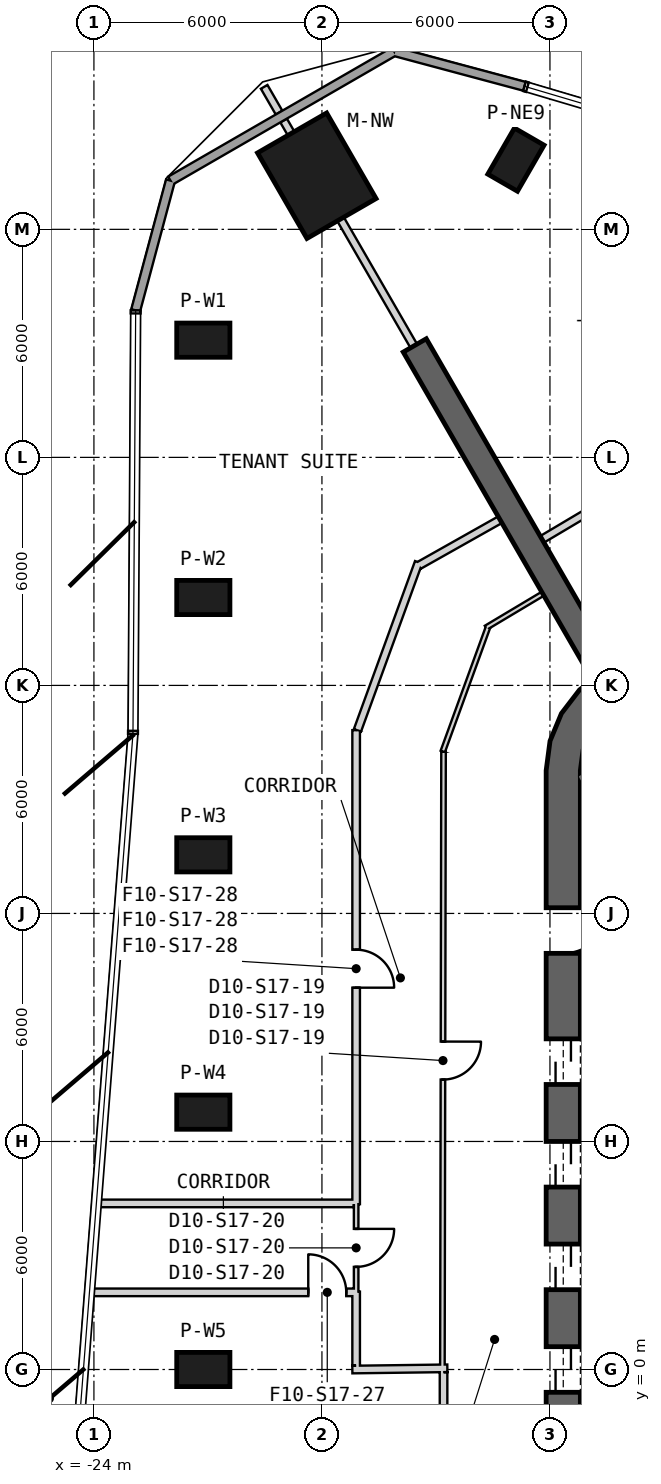
"""IFC4 building model, lengths in metres.
Left out: names, types, materials, properties, quantities, classifications, styles, units other than length and angle.
Written with IfcOpenShell. Run it as: python <this file> out.ifc"""

import sys

from ifc_helpers import new_model, si_unit, direction, frame, frame_2d, origin, origin_2d, place, context, subcontext, project, spatial, polyline, rectangle, outline, extrude, element, fill, save


model = new_model("IFC4")
c1 = context("Model", 3, precision=1e-05, world=origin(), true_north=direction((0.0, 1.0)))
c2 = subcontext(c1, "Body", "Model", "MODEL_VIEW")
j1 = project(units=[si_unit("LENGTHUNIT", "METRE"), si_unit("PLANEANGLEUNIT", "RADIAN")], contexts=[c1])
p1 = place(None, origin())
s1 = spatial("IfcSite", under=j1, at=p1, CompositionType="ELEMENT")
p2 = place(p1, origin())
s2 = spatial("IfcBuilding", under=s1, at=p2, CompositionType="ELEMENT")
p3 = place(p2, frame((0.0, 0.0, 265.2)))
s3 = spatial("IfcBuildingStorey", under=s2, at=p3, CompositionType="ELEMENT", Elevation=265.2)
p4 = place(p3, frame((-18.135, 31.411, 0.0), z_axis=(0.0, 0.0, 1.0), x_axis=(-0.5, 0.866025403784, 0.0)))
e1 = element("IfcColumn", 1, at=p4, inside=s3, PredefinedType="COLUMN", context=c2, shape_type="SweptSolid", body=[
    extrude(rectangle(XDim=2.6, YDim=2.1, at=origin_2d()), origin(), (0.0, 0.0, 1.0), 4.0),
])
for number, where, z_axis, x_axis in (
    (2, (-21.121, 27.084, 0.0), (0.0, 0.0, 1.0), (-1.0, 0.0, 0.0)),
    (3, (-21.121, 20.313, 0.0), (0.0, 0.0, 1.0), (-1.0, 0.0, 0.0)),
    (4, (-21.121, 13.542, 0.0), (0.0, 0.0, 1.0), (-1.0, 0.0, 0.0)),
    (5, (-21.121, 6.771, 0.0), (0.0, 0.0, 1.0), (-1.0, 0.0, 0.0)),
    (6, (-21.121, 0.0, 0.0), (0.0, 0.0, 1.0), (-1.0, 0.0, 0.0)),
    (7, (-12.895, 31.833, 0.0), (0.0, 0.0, 1.0), (0.5, 0.866, 0.0)),
):
    element("IfcColumn", number, at=place(p3, frame(where, z_axis=z_axis, x_axis=x_axis)), inside=s3, PredefinedType="COLUMN", context=c2, shape_type="SweptSolid", body=[
        extrude(rectangle(XDim=1.4, YDim=0.9, at=origin_2d()), origin(), (0.0, 0.0, 1.0), 4.0),
    ])
p5 = place(p3, frame((-11.65, 15.762, 0.0), z_axis=(0.0, 0.0, 1.0), x_axis=(0.0, -1.0, 0.0)))
e8 = element("IfcWall", 8, at=p5, inside=s3, PredefinedType="SHEAR", context=c2, shape_type="SweptSolid", body=[
    extrude(rectangle(XDim=31.523, YDim=0.9, at=frame_2d((15.762, 0.0))), origin(), (0.0, 0.0, 1.0), 4.0),
])
p6 = place(p5, frame((7.062, 0.0, 0.0)))
e9 = element("IfcOpeningElement", 9, at=p6, cuts=e8, PredefinedType="OPENING", context=c2, shape_type="SweptSolid", body=[
    extrude(rectangle(XDim=1.2, YDim=2.4, at=frame_2d((0.6, 1.2))), frame((0.0, 0.46, 0.0), z_axis=(0.0, -1.0, 0.0), x_axis=(1.0, 0.0, 0.0)), (0.0, 0.0, 1.0), 0.92),
])
p7 = place(p5, frame((9.762, 0.0, 0.0)))
e10 = element("IfcOpeningElement", 10, at=p7, cuts=e8, PredefinedType="OPENING", context=c2, shape_type="SweptSolid", body=[
    extrude(rectangle(XDim=1.2, YDim=2.4, at=frame_2d((0.6, 1.2))), frame((0.0, 0.46, 0.0), z_axis=(0.0, -1.0, 0.0), x_axis=(1.0, 0.0, 0.0)), (0.0, 0.0, 1.0), 0.92),
])
p8 = place(p5, frame((12.462, 0.0, 0.0)))
e11 = element("IfcOpeningElement", 11, at=p8, cuts=e8, PredefinedType="OPENING", context=c2, shape_type="SweptSolid", body=[
    extrude(rectangle(XDim=1.2, YDim=2.4, at=frame_2d((0.6, 1.2))), frame((0.0, 0.46, 0.0), z_axis=(0.0, -1.0, 0.0), x_axis=(1.0, 0.0, 0.0)), (0.0, 0.0, 1.0), 0.92),
])
p9 = place(p5, frame((15.162, 0.0, 0.0)))
e12 = element("IfcOpeningElement", 12, at=p9, cuts=e8, PredefinedType="OPENING", context=c2, shape_type="SweptSolid", body=[
    extrude(rectangle(XDim=1.2, YDim=2.4, at=frame_2d((0.6, 1.2))), frame((0.0, 0.46, 0.0), z_axis=(0.0, -1.0, 0.0), x_axis=(1.0, 0.0, 0.0)), (0.0, 0.0, 1.0), 0.92),
])
p10 = place(p5, frame((17.862, 0.0, 0.0)))
e13 = element("IfcOpeningElement", 13, at=p10, cuts=e8, PredefinedType="OPENING", context=c2, shape_type="SweptSolid", body=[
    extrude(rectangle(XDim=1.2, YDim=2.4, at=frame_2d((0.6, 1.2))), frame((0.0, 0.46, 0.0), z_axis=(0.0, -1.0, 0.0), x_axis=(1.0, 0.0, 0.0)), (0.0, 0.0, 1.0), 0.92),
])
p11 = place(p5, frame((20.562, 0.0, 0.0)))
e14 = element("IfcOpeningElement", 14, at=p11, cuts=e8, PredefinedType="OPENING", context=c2, shape_type="SweptSolid", body=[
    extrude(rectangle(XDim=1.2, YDim=2.4, at=frame_2d((0.6, 1.2))), frame((0.0, 0.46, 0.0), z_axis=(0.0, -1.0, 0.0), x_axis=(1.0, 0.0, 0.0)), (0.0, 0.0, 1.0), 0.92),
])
p12 = place(p5, frame((23.262, 0.0, 0.0)))
e15 = element("IfcOpeningElement", 15, at=p12, cuts=e8, PredefinedType="OPENING", context=c2, shape_type="SweptSolid", body=[
    extrude(rectangle(XDim=1.2, YDim=2.4, at=frame_2d((0.6, 1.2))), frame((0.0, 0.46, 0.0), z_axis=(0.0, -1.0, 0.0), x_axis=(1.0, 0.0, 0.0)), (0.0, 0.0, 1.0), 0.92),
])
p13 = place(p5, frame((3.612, 0.0, 0.0)))
e16 = element("IfcOpeningElement", 16, at=p13, cuts=e8, PredefinedType="OPENING", context=c2, shape_type="SweptSolid", body=[
    extrude(rectangle(XDim=1.2, YDim=2.4, at=frame_2d((0.6, 1.2))), frame((0.0, 0.46, 0.0), z_axis=(0.0, -1.0, 0.0), x_axis=(1.0, 0.0, 0.0)), (0.0, 0.0, 1.0), 0.92),
])
p14 = place(p5, frame((26.712, 0.0, 0.0)))
e17 = element("IfcOpeningElement", 17, at=p14, cuts=e8, PredefinedType="OPENING", context=c2, shape_type="SweptSolid", body=[
    extrude(rectangle(XDim=1.2, YDim=2.4, at=frame_2d((0.6, 1.2))), frame((0.0, 0.46, 0.0), z_axis=(0.0, -1.0, 0.0), x_axis=(1.0, 0.0, 0.0)), (0.0, 0.0, 1.0), 0.92),
])
p15 = place(p3, origin())
e18 = element("IfcWall", 18, at=p15, inside=s3, PredefinedType="SHEAR", context=c2, shape_type="SweptSolid", body=[
    extrude(outline(polyline([(-7.6, 18.36), (-8.323, 18.659), (-9.1, 18.762), (-9.876, 18.659), (-10.6, 18.36), (-11.221, 17.883), (-11.698, 17.262), (-11.998, 16.538), (-12.1, 15.762), (-11.2, 15.762), (-11.128, 16.305), (-10.919, 16.812), (-10.585, 17.247), (-10.15, 17.58), (-9.644, 17.79), (-9.1, 17.862), (-8.556, 17.79), (-8.05, 17.58), (-7.6, 18.36)])), origin(), (0.0, 0.0, 1.0), 4.0),
])
p16 = place(p3, frame((-10.575, 18.316, 0.0), z_axis=(0.0, 0.0, 1.0), x_axis=(-0.500007350791, 0.866021159762, 0.0)))
e19 = element("IfcWall", 19, at=p16, inside=s3, PredefinedType="SHEAR", context=c2, shape_type="SweptSolid", body=[
    extrude(rectangle(XDim=9.965, YDim=0.7, at=frame_2d((4.982, 0.0))), origin(), (0.0, 0.0, 1.0), 4.0),
])
p17 = place(p3, frame((-12.67, 33.764, 0.0), z_axis=(0.0, 0.0, 1.0), x_axis=(-0.965927175343, 0.258814010312, 0.0)))
e20 = element("IfcWall", 20, at=p17, inside=s3, PredefinedType="SOLIDWALL", context=c2, shape_type="SweptSolid", body=[
    extrude(rectangle(XDim=3.55, YDim=0.24, at=frame_2d((1.775, 0.0))), origin(), (0.0, 0.0, 1.0), 3.7),
])
p18 = place(p3, frame((-16.099, 34.682, 0.0), z_axis=(0.0, 0.0, 1.0), x_axis=(-0.866022320763, -0.500005339912, 0.0)))
e21 = element("IfcWall", 21, at=p18, inside=s3, PredefinedType="SOLIDWALL", context=c2, shape_type="SweptSolid", body=[
    extrude(rectangle(XDim=6.798, YDim=0.24, at=frame_2d((3.399, 0.0))), origin(), (0.0, 0.0, 1.0), 3.7),
])
p19 = place(p3, frame((-21.986, 31.283, 0.0), z_axis=(0.0, 0.0, 1.0), x_axis=(-0.258844219627, -0.965919080444, 0.0)))
e22 = element("IfcWall", 22, at=p19, inside=s3, PredefinedType="SOLIDWALL", context=c2, shape_type="SweptSolid", body=[
    extrude(rectangle(XDim=3.536, YDim=0.24, at=frame_2d((1.768, 0.0))), origin(), (0.0, 0.0, 1.0), 3.7),
])
p20 = place(p3, frame((-11.2, 9.42, 0.0), z_axis=(0.0, 0.0, 1.0), x_axis=(0.999957167047, 0.009255488683, 0.0)))
e23 = element("IfcWall", 23, at=p20, inside=s3, PredefinedType="PLUMBINGWALL", context=c2, shape_type="SweptSolid", body=[
    extrude(rectangle(XDim=3.35, YDim=0.2, at=frame_2d((1.675, 0.0))), origin(), (0.0, 0.0, 1.0), 3.7),
])
p21 = place(p3, frame((-11.245, 15.678, -0.3), z_axis=(0.0, 0.0, 1.0), x_axis=(0.499977274689, -0.866038523851, 0.0)))
e24 = element("IfcWall", 24, at=p21, inside=s3, PredefinedType="SHEAR", context=c2, shape_type="SweptSolid", body=[
    extrude(rectangle(XDim=8.1, YDim=0.2, at=frame_2d((4.05, 0.0))), origin(), (0.0, 0.0, 1.0), 4.0),
])
p22 = place(p3, frame((-12.189, 20.411, 0.0), z_axis=(0.0, 0.0, 1.0), x_axis=(-0.858492721014, -0.51282574815, 0.0)))
e25 = element("IfcWall", 25, at=p22, inside=s3, PredefinedType="PARTITIONING", context=c2, shape_type="SweptSolid", body=[
    extrude(rectangle(XDim=1.742, YDim=0.12, at=frame_2d((0.871, 0.0))), origin(), (0.0, 0.0, 1.0), 3.7),
])
p23 = place(p3, frame((-13.631, 19.53, 0.0), z_axis=(0.0, 0.0, 1.0), x_axis=(-0.342069878069, -0.939674517329, 0.0)))
e26 = element("IfcWall", 26, at=p23, inside=s3, PredefinedType="PARTITIONING", context=c2, shape_type="SweptSolid", body=[
    extrude(rectangle(XDim=3.479, YDim=0.12, at=frame_2d((1.739, 0.0))), origin(), (0.0, 0.0, 1.0), 2.88),
])
p24 = place(p3, frame((-14.8, 16.257, 0.0), z_axis=(0.0, 0.0, 1.0), x_axis=(-0.001847148781, -0.999998294019, 0.0)))
e27 = element("IfcWall", 27, at=p24, inside=s3, PredefinedType="PARTITIONING", context=c2, shape_type="SweptSolid", body=[
    extrude(rectangle(XDim=16.257, YDim=0.12, at=frame_2d((8.128, 0.0))), origin(), (0.0, 0.0, 1.0), 2.98),
])
p25 = place(p24, frame((7.629, 0.0, 0.0)))
e28 = element("IfcOpeningElement", 28, at=p25, cuts=e27, PredefinedType="OPENING", context=c2, shape_type="SweptSolid", body=[
    extrude(rectangle(XDim=1.0, YDim=2.1, at=frame_2d((0.5, 1.05))), frame((0.0, 0.07, 0.0), z_axis=(0.0, -1.0, 0.0), x_axis=(1.0, 0.0, 0.0)), (0.0, 0.0, 1.0), 0.14),
])
p26 = place(p3, frame((-17.1, 4.35, 0.0), z_axis=(0.0, 0.0, 1.0), x_axis=(0.0, -1.0, 0.0)))
e29 = element("IfcWall", 29, at=p26, inside=s3, PredefinedType="PARTITIONING", context=c2, shape_type="SweptSolid", body=[
    extrude(rectangle(XDim=2.3, YDim=0.12, at=frame_2d((1.15, 0.0))), origin(), (0.0, 0.0, 1.0), 3.7),
])
p27 = place(p26, frame((0.65, 0.0, 0.0)))
e30 = element("IfcOpeningElement", 30, at=p27, cuts=e29, PredefinedType="OPENING", context=c2, shape_type="SweptSolid", body=[
    extrude(rectangle(XDim=1.0, YDim=2.1, at=frame_2d((0.5, 1.05))), frame((0.0, 0.07, 0.0), z_axis=(0.0, -1.0, 0.0), x_axis=(1.0, 0.0, 0.0)), (0.0, 0.0, 1.0), 0.14),
])
p28 = place(p3, frame((-17.2, -0.001, 0.0), z_axis=(0.0, 0.0, 1.0), x_axis=(0.999915662945, 0.012987185857, 0.0)))
e31 = element("IfcWall", 31, at=p28, inside=s3, PredefinedType="PARTITIONING", context=c2, shape_type="SweptSolid", body=[
    extrude(rectangle(XDim=2.5, YDim=0.2, at=frame_2d((1.25, 0.0))), origin(), (0.0, 0.0, 1.0), 3.07),
])
p29 = place(p3, frame((-17.1, 16.823, 0.0), z_axis=(0.0, 0.0, 1.0), x_axis=(0.0, -1.0, 0.0)))
e32 = element("IfcWall", 32, at=p29, inside=s3, PredefinedType="PARTITIONING", context=c2, shape_type="SweptSolid", body=[
    extrude(rectangle(XDim=12.473, YDim=0.2, at=frame_2d((6.236, 0.0))), origin(), (0.0, 0.0, 1.0), 2.98),
])
p30 = place(p29, frame((5.776, 0.0, 0.0)))
e33 = element("IfcOpeningElement", 33, at=p30, cuts=e32, PredefinedType="OPENING", context=c2, shape_type="SweptSolid", body=[
    extrude(rectangle(XDim=1.0, YDim=2.1, at=frame_2d((0.5, 1.05))), frame((0.0, 0.11, 0.0), z_axis=(0.0, -1.0, 0.0), x_axis=(1.0, 0.0, 0.0)), (0.0, 0.0, 1.0), 0.22),
])
p31 = place(p3, frame((-17.1, 2.05, 0.0), z_axis=(0.0, 0.0, 1.0), x_axis=(0.0, -1.0, 0.0)))
e34 = element("IfcWall", 34, at=p31, inside=s3, PredefinedType="PARTITIONING", context=c2, shape_type="SweptSolid", body=[
    extrude(rectangle(XDim=1.95, YDim=0.2, at=frame_2d((0.975, 0.0))), origin(), (0.0, 0.0, 1.0), 3.07),
])
p32 = place(p3, frame((-15.456, 21.239, 0.0), z_axis=(0.0, 0.0, 1.0), x_axis=(-0.34205546997, -0.939679762187, 0.0)))
e35 = element("IfcWall", 35, at=p32, inside=s3, PredefinedType="PARTITIONING", context=c2, shape_type="SweptSolid", body=[
    extrude(rectangle(XDim=4.706, YDim=0.2, at=frame_2d((2.353, 0.0))), origin(), (0.0, 0.0, 1.0), 2.88),
])
p33 = place(p3, frame((-13.313, 22.359, 0.0), z_axis=(0.0, 0.0, 1.0), x_axis=(-0.87121710687, -0.490897904555, 0.0)))
e36 = element("IfcWall", 36, at=p33, inside=s3, PredefinedType="PARTITIONING", context=c2, shape_type="SweptSolid", body=[
    extrude(rectangle(XDim=2.457, YDim=0.2, at=frame_2d((1.229, 0.0))), origin(), (0.0, 0.0, 1.0), 3.7),
])
p34 = place(p3, frame((-14.8, -0.07, 0.0), z_axis=(0.0, 0.0, 1.0), x_axis=(0.0, -1.0, 0.0)))
e37 = element("IfcWall", 37, at=p34, inside=s3, PredefinedType="PARTITIONING", context=c2, shape_type="SweptSolid", body=[
    extrude(rectangle(XDim=10.13, YDim=0.2, at=frame_2d((5.065, 0.0))), origin(), (0.0, 0.0, 1.0), 3.07),
])
p35 = place(p3, frame((-10.265, 22.996, 0.0), z_axis=(0.0, 0.0, 1.0), x_axis=(-0.859934823121, -0.510403859687, 0.0)))
e38 = element("IfcWall", 38, at=p35, inside=s3, PredefinedType="PARTITIONING", context=c2, shape_type="SweptSolid", body=[
    extrude(rectangle(XDim=2.258, YDim=0.2, at=frame_2d((1.129, 0.0))), origin(), (0.0, 0.0, 1.0), 3.7),
])
p36 = place(p3, frame((-24.118, 2.03, 0.0), z_axis=(0.0, 0.0, 1.0), x_axis=(1.0, 0.0, 0.0)))
e39 = element("IfcWall", 39, at=p36, inside=s3, PredefinedType="PARTITIONING", context=c2, shape_type="SweptSolid", body=[
    extrude(rectangle(XDim=6.958, YDim=0.2, at=frame_2d((3.479, 0.0))), origin(), (0.0, 0.0, 1.0), 3.7),
])
p37 = place(p36, frame((5.758, 0.0, 0.0)))
e40 = element("IfcOpeningElement", 40, at=p37, cuts=e39, PredefinedType="OPENING", context=c2, shape_type="SweptSolid", body=[
    extrude(rectangle(XDim=1.0, YDim=2.1, at=frame_2d((0.5, 1.05))), frame((0.0, 0.11, 0.0), z_axis=(0.0, -1.0, 0.0), x_axis=(1.0, 0.0, 0.0)), (0.0, 0.0, 1.0), 0.22),
])
p38 = place(p3, frame((-17.16, 4.37, 0.0), z_axis=(0.0, 0.0, 1.0), x_axis=(-1.0, 0.0, 0.0)))
e41 = element("IfcWall", 41, at=p38, inside=s3, PredefinedType="PARTITIONING", context=c2, shape_type="SweptSolid", body=[
    extrude(rectangle(XDim=6.776, YDim=0.2, at=frame_2d((3.388, 0.0))), origin(), (0.0, 0.0, 1.0), 3.7),
])
p39 = place(p3, frame((-19.52, 33.75, 0.0), z_axis=(0.0, 0.0, 1.0), x_axis=(0.499929430274, -0.866066143401, 0.0)))
e42 = element("IfcWall", 42, at=p39, inside=s3, PredefinedType="PARTITIONING", context=c2, shape_type="SweptSolid", body=[
    extrude(rectangle(XDim=0.783, YDim=0.2, at=frame_2d((0.391, 0.0))), origin(), (0.0, 0.0, 1.0), 3.7),
])
p40 = place(p3, frame((-19.009, 32.864, 0.0), z_axis=(0.0, 0.0, 1.0), x_axis=(0.500061319399, -0.865989998118, 0.0)))
e43 = element("IfcWall", 43, at=p40, inside=s3, PredefinedType="PARTITIONING", context=c2, shape_type="SweptSolid", body=[
    extrude(rectangle(XDim=0.395, YDim=0.2, at=frame_2d((0.198, 0.0))), origin(), (0.0, 0.0, 1.0), 3.7),
])
p41 = place(p3, frame((-17.511, 30.27, 0.0), z_axis=(0.0, 0.0, 1.0), x_axis=(0.499980071345, -0.866036909293, 0.0)))
e44 = element("IfcWall", 44, at=p41, inside=s3, PredefinedType="PARTITIONING", context=c2, shape_type="SweptSolid", body=[
    extrude(rectangle(XDim=3.856, YDim=0.2, at=frame_2d((1.928, 0.0))), origin(), (0.0, 0.0, 1.0), 3.27),
])
p42 = place(p25, origin())
e45 = element("IfcDoor", 45, at=p42, inside=s3, OperationType="SINGLE_SWING_RIGHT", PredefinedType="NOTDEFINED", context=c2, shape_type="SweptSolid", body=[
    extrude(rectangle(XDim=1.0, YDim=2.1, at=frame_2d((0.5, 1.05))), frame((0.0, 0.025, 0.0), z_axis=(0.0, -1.0, 0.0), x_axis=(1.0, 0.0, 0.0)), (0.0, 0.0, 1.0), 0.05),
])
fill(e28, e45)
p43 = place(p27, origin())
e46 = element("IfcDoor", 46, at=p43, inside=s3, OperationType="SINGLE_SWING_RIGHT", PredefinedType="NOTDEFINED", context=c2, shape_type="SweptSolid", body=[
    extrude(rectangle(XDim=1.0, YDim=2.1, at=frame_2d((0.5, 1.05))), frame((0.0, 0.025, 0.0), z_axis=(0.0, -1.0, 0.0), x_axis=(1.0, 0.0, 0.0)), (0.0, 0.0, 1.0), 0.05),
])
fill(e30, e46)
p44 = place(p37, origin())
e47 = element("IfcDoor", 47, at=p44, inside=s3, OperationType="SINGLE_SWING_RIGHT", PredefinedType="USERDEFINED", context=c2, shape_type="SweptSolid", body=[
    extrude(rectangle(XDim=1.0, YDim=2.1, at=frame_2d((0.5, 1.05))), frame((0.0, 0.025, 0.0), z_axis=(0.0, -1.0, 0.0), x_axis=(1.0, 0.0, 0.0)), (0.0, 0.0, 1.0), 0.05),
])
fill(e40, e47)
p45 = place(p30, origin())
e48 = element("IfcDoor", 48, at=p45, inside=s3, OperationType="SINGLE_SWING_RIGHT", PredefinedType="USERDEFINED", context=c2, shape_type="SweptSolid", body=[
    extrude(rectangle(XDim=1.0, YDim=2.1, at=frame_2d((0.5, 1.05))), frame((0.0, 0.025, 0.0), z_axis=(0.0, -1.0, 0.0), x_axis=(1.0, 0.0, 0.0)), (0.0, 0.0, 1.0), 0.05),
])
fill(e33, e48)
p46 = place(p6, origin())
e49 = element("IfcDoor", 49, at=p46, inside=s3, OperationType="SLIDING_TO_LEFT", PredefinedType="USERDEFINED", context=c2, shape_type="SweptSolid", body=[
    extrude(rectangle(XDim=1.2, YDim=2.4, at=frame_2d((0.6, 1.2))), frame((0.0, 0.025, 0.0), z_axis=(0.0, -1.0, 0.0), x_axis=(1.0, 0.0, 0.0)), (0.0, 0.0, 1.0), 0.05),
])
fill(e9, e49)
p47 = place(p7, origin())
e50 = element("IfcDoor", 50, at=p47, inside=s3, OperationType="SLIDING_TO_LEFT", PredefinedType="USERDEFINED", context=c2, shape_type="SweptSolid", body=[
    extrude(rectangle(XDim=1.2, YDim=2.4, at=frame_2d((0.6, 1.2))), frame((0.0, 0.025, 0.0), z_axis=(0.0, -1.0, 0.0), x_axis=(1.0, 0.0, 0.0)), (0.0, 0.0, 1.0), 0.05),
])
fill(e10, e50)
p48 = place(p8, origin())
e51 = element("IfcDoor", 51, at=p48, inside=s3, OperationType="SLIDING_TO_LEFT", PredefinedType="USERDEFINED", context=c2, shape_type="SweptSolid", body=[
    extrude(rectangle(XDim=1.2, YDim=2.4, at=frame_2d((0.6, 1.2))), frame((0.0, 0.025, 0.0), z_axis=(0.0, -1.0, 0.0), x_axis=(1.0, 0.0, 0.0)), (0.0, 0.0, 1.0), 0.05),
])
fill(e11, e51)
p49 = place(p9, origin())
e52 = element("IfcDoor", 52, at=p49, inside=s3, OperationType="SLIDING_TO_LEFT", PredefinedType="USERDEFINED", context=c2, shape_type="SweptSolid", body=[
    extrude(rectangle(XDim=1.2, YDim=2.4, at=frame_2d((0.6, 1.2))), frame((0.0, 0.025, 0.0), z_axis=(0.0, -1.0, 0.0), x_axis=(1.0, 0.0, 0.0)), (0.0, 0.0, 1.0), 0.05),
])
fill(e12, e52)
p50 = place(p13, origin())
e53 = element("IfcDoor", 53, at=p50, inside=s3, OperationType="SINGLE_SWING_RIGHT", PredefinedType="USERDEFINED", context=c2, shape_type="SweptSolid", body=[
    extrude(rectangle(XDim=1.2, YDim=2.4, at=frame_2d((0.6, 1.2))), frame((0.0, 0.025, 0.0), z_axis=(0.0, -1.0, 0.0), x_axis=(1.0, 0.0, 0.0)), (0.0, 0.0, 1.0), 0.05),
])
fill(e16, e53)
save(model, sys.argv[1])
